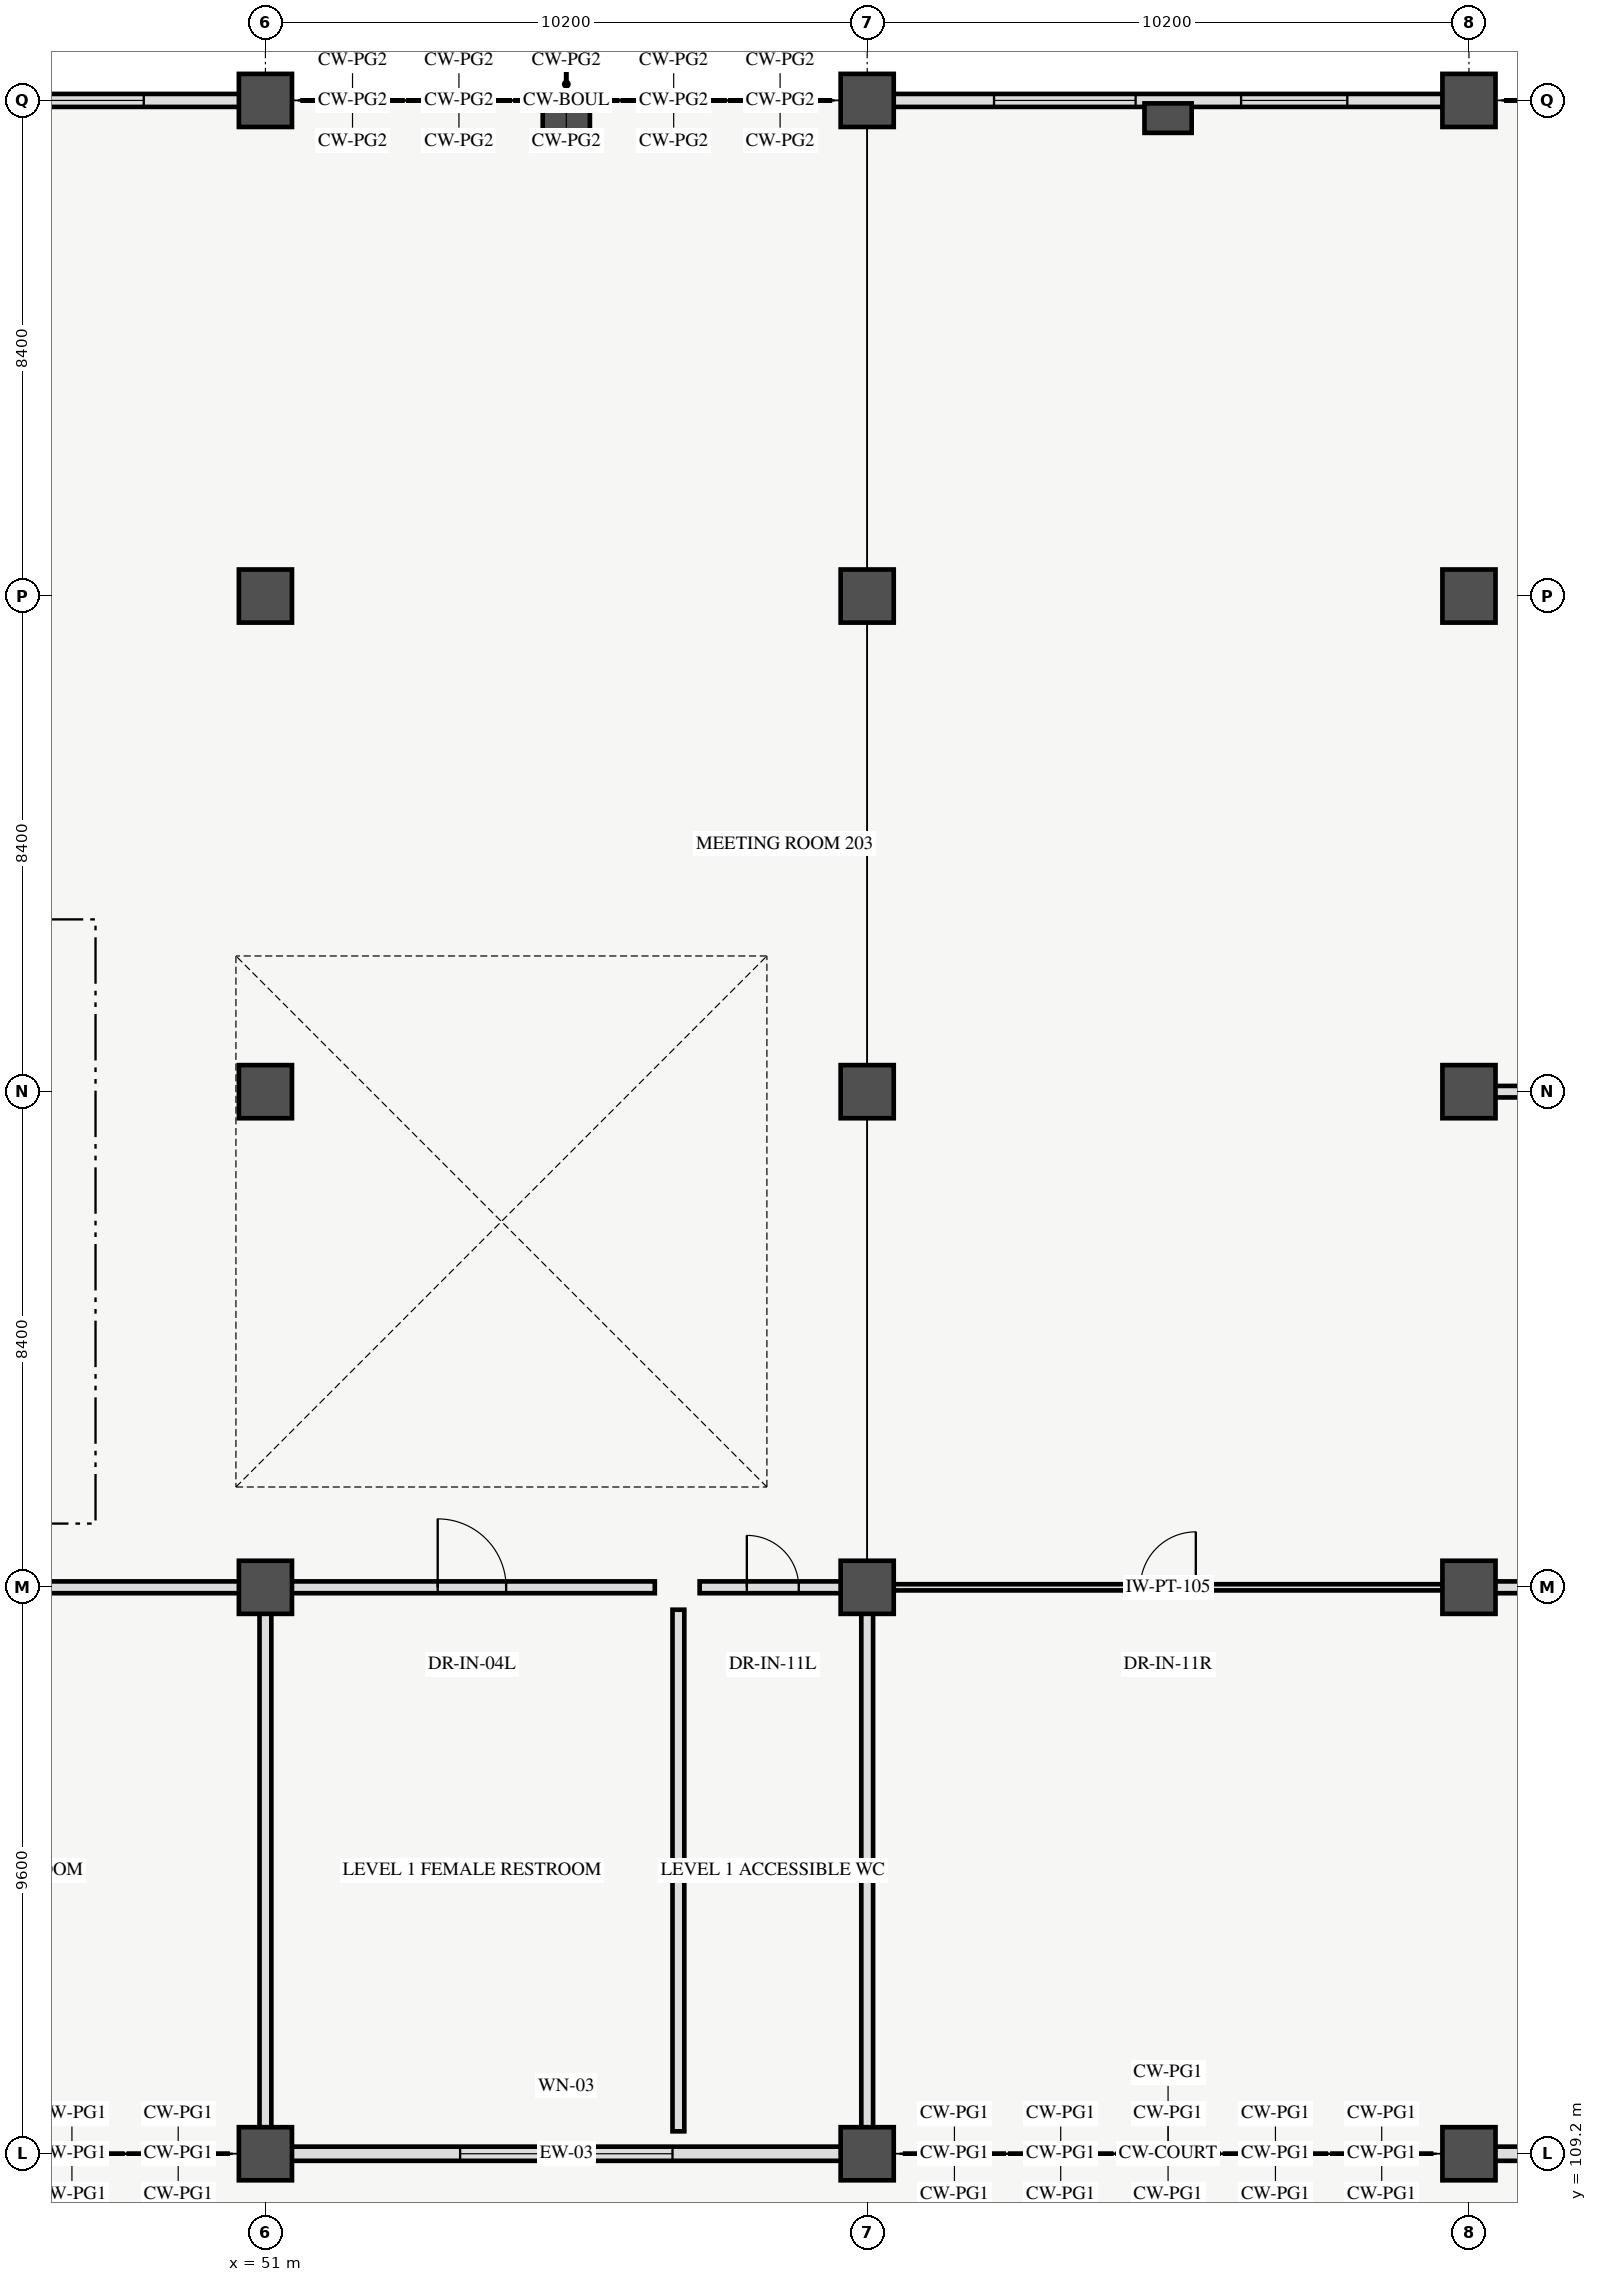
"""IFC4 building model, lengths in metres.
Left out: names, types, materials, properties, quantities, classifications, styles, units other than length and angle.
Written with IfcOpenShell. Run it as: python <this file> out.ifc"""

import sys

from ifc_helpers import new_model, si_unit, direction, frame, frame_2d, origin, origin_2d, place, context, subcontext, project, spatial, rectangle, extrude, element, fill, save


model = new_model("IFC4")
c1 = context("Model", 3, precision=1e-05, world=origin(), true_north=direction((0.0, 1.0)))
c2 = subcontext(c1, "Body", "Model", "MODEL_VIEW")
j1 = project(units=[si_unit("LENGTHUNIT", "METRE"), si_unit("PLANEANGLEUNIT", "RADIAN")], contexts=[c1])
p1 = place(None, origin())
s1 = spatial("IfcSite", under=j1, at=p1, CompositionType="ELEMENT")
p2 = place(p1, origin())
s2 = spatial("IfcBuilding", under=s1, at=p2, CompositionType="ELEMENT")
p3 = place(p2, frame((0.0, 0.0, 5.4)))
s3 = spatial("IfcBuildingStorey", under=s2, at=p3, CompositionType="ELEMENT", Elevation=5.4)
for number, where, z_axis, x_axis in (
    (1, (51.0, 109.2, 0.0), (0.0, 0.0, 1.0), (1.0, 0.0, 0.0)),
    (2, (51.0, 118.8, 0.0), (0.0, 0.0, 1.0), (1.0, 0.0, 0.0)),
    (3, (51.0, 127.2, 0.0), (0.0, 0.0, 1.0), (1.0, 0.0, 0.0)),
    (4, (51.0, 135.6, 0.0), (0.0, 0.0, 1.0), (1.0, 0.0, 0.0)),
    (5, (51.0, 144.0, 0.0), (0.0, 0.0, 1.0), (1.0, 0.0, 0.0)),
    (6, (61.2, 109.2, 0.0), (0.0, 0.0, 1.0), (1.0, 0.0, 0.0)),
    (7, (61.2, 118.8, 0.0), (0.0, 0.0, 1.0), (1.0, 0.0, 0.0)),
    (8, (61.2, 127.2, 0.0), (0.0, 0.0, 1.0), (1.0, 0.0, 0.0)),
    (9, (61.2, 135.6, 0.0), (0.0, 0.0, 1.0), (1.0, 0.0, 0.0)),
    (10, (61.2, 144.0, 0.0), (0.0, 0.0, 1.0), (1.0, 0.0, 0.0)),
    (11, (71.4, 109.2, 0.0), (0.0, 0.0, 1.0), (1.0, 0.0, 0.0)),
    (12, (71.4, 118.8, 0.0), (0.0, 0.0, 1.0), (1.0, 0.0, 0.0)),
    (13, (71.4, 127.2, 0.0), (0.0, 0.0, 1.0), (1.0, 0.0, 0.0)),
    (14, (71.4, 135.6, 0.0), (0.0, 0.0, 1.0), (1.0, 0.0, 0.0)),
    (15, (71.4, 144.0, 0.0), (0.0, 0.0, 1.0), (1.0, 0.0, 0.0)),
):
    element("IfcColumn", number, at=place(p3, frame(where, z_axis=z_axis, x_axis=x_axis)), inside=s3, PredefinedType="COLUMN", context=c2, shape_type="SweptSolid", body=[
        extrude(rectangle(XDim=0.9, YDim=0.9, at=origin_2d()), origin(), (0.0, 0.0, 1.0), 5.4),
    ])
for number, where, z_axis, x_axis in (
    (16, (56.1, 143.7, 0.0), (0.0, 0.0, 1.0), (1.0, 0.0, 0.0)),
    (17, (66.3, 143.7, 0.0), (0.0, 0.0, 1.0), (1.0, 0.0, 0.0)),
):
    element("IfcColumn", number, at=place(p3, frame(where, z_axis=z_axis, x_axis=x_axis)), inside=s3, PredefinedType="PILASTER", context=c2, shape_type="SweptSolid", body=[
        extrude(rectangle(XDim=0.8, YDim=0.5, at=origin_2d()), origin(), (0.0, 0.0, 1.0), 5.4),
    ])
p4 = place(p3, frame((41.04, 144.0, 0.0), z_axis=(0.0, 0.0, 1.0), x_axis=(1.0, 0.0, 0.0)))
e18 = element("IfcWall", 18, at=p4, inside=s3, PredefinedType="STANDARD", context=c2, shape_type="SweptSolid", body=[
    extrude(rectangle(XDim=9.72, YDim=0.22, at=frame_2d((4.86, 0.0))), origin(), (0.0, 0.0, 1.0), 4.32),
])
p5 = place(p4, frame((1.91, 0.0, 0.7)))
e19 = element("IfcOpeningElement", 19, at=p5, cuts=e18, PredefinedType="OPENING", context=c2, shape_type="SweptSolid", body=[
    extrude(rectangle(XDim=2.4, YDim=2.1, at=frame_2d((1.2, 1.05))), frame((0.0, 0.12, 0.0), z_axis=(0.0, -1.0, 0.0), x_axis=(1.0, 0.0, 0.0)), (0.0, 0.0, 1.0), 0.24),
])
p6 = place(p4, frame((6.098, 0.0, 0.85)))
e20 = element("IfcOpeningElement", 20, at=p6, cuts=e18, PredefinedType="OPENING", context=c2, shape_type="SweptSolid", body=[
    extrude(rectangle(XDim=1.8, YDim=1.8, at=frame_2d((0.9, 0.9))), frame((0.0, 0.12, 0.0), z_axis=(0.0, -1.0, 0.0), x_axis=(1.0, 0.0, 0.0)), (0.0, 0.0, 1.0), 0.24),
])
p7 = place(p3, frame((51.24, 109.2, 0.0), z_axis=(0.0, 0.0, 1.0), x_axis=(1.0, 0.0, 0.0)))
e21 = element("IfcWall", 21, at=p7, inside=s3, PredefinedType="STANDARD", context=c2, shape_type="SweptSolid", body=[
    extrude(rectangle(XDim=9.72, YDim=0.24, at=frame_2d((4.86, 0.0))), origin(), (0.0, 0.0, 1.0), 4.32),
])
p8 = place(p7, frame((3.06, 0.0, 0.9)))
e22 = element("IfcOpeningElement", 22, at=p8, cuts=e21, PredefinedType="OPENING", context=c2, shape_type="SweptSolid", body=[
    extrude(rectangle(XDim=3.6, YDim=2.1, at=frame_2d((1.8, 1.05))), frame((0.0, 0.13, 0.0), z_axis=(0.0, -1.0, 0.0), x_axis=(1.0, 0.0, 0.0)), (0.0, 0.0, 1.0), 0.26),
])
p9 = place(p3, frame((61.44, 144.0, 0.0), z_axis=(0.0, 0.0, 1.0), x_axis=(1.0, 0.0, 0.0)))
e23 = element("IfcWall", 23, at=p9, inside=s3, PredefinedType="STANDARD", context=c2, shape_type="SweptSolid", body=[
    extrude(rectangle(XDim=9.72, YDim=0.22, at=frame_2d((4.86, 0.0))), origin(), (0.0, 0.0, 1.0), 4.32),
])
p10 = place(p9, frame((1.91, 0.0, 0.7)))
e24 = element("IfcOpeningElement", 24, at=p10, cuts=e23, PredefinedType="OPENING", context=c2, shape_type="SweptSolid", body=[
    extrude(rectangle(XDim=2.4, YDim=2.1, at=frame_2d((1.2, 1.05))), frame((0.0, 0.12, 0.0), z_axis=(0.0, -1.0, 0.0), x_axis=(1.0, 0.0, 0.0)), (0.0, 0.0, 1.0), 0.24),
])
p11 = place(p9, frame((6.098, 0.0, 0.85)))
e25 = element("IfcOpeningElement", 25, at=p11, cuts=e23, PredefinedType="OPENING", context=c2, shape_type="SweptSolid", body=[
    extrude(rectangle(XDim=1.8, YDim=1.8, at=frame_2d((0.9, 0.9))), frame((0.0, 0.12, 0.0), z_axis=(0.0, -1.0, 0.0), x_axis=(1.0, 0.0, 0.0)), (0.0, 0.0, 1.0), 0.24),
])
p12 = place(p3, frame((71.64, 109.2, 0.0), z_axis=(0.0, 0.0, 1.0), x_axis=(1.0, 0.0, 0.0)))
e26 = element("IfcWall", 26, at=p12, inside=s3, PredefinedType="STANDARD", context=c2, shape_type="SweptSolid", body=[
    extrude(rectangle(XDim=9.72, YDim=0.24, at=frame_2d((4.86, 0.0))), origin(), (0.0, 0.0, 1.0), 4.32),
])
p13 = place(p12, frame((3.06, 0.0, 0.9)))
e27 = element("IfcOpeningElement", 27, at=p13, cuts=e26, PredefinedType="OPENING", context=c2, shape_type="SweptSolid", body=[
    extrude(rectangle(XDim=3.6, YDim=2.1, at=frame_2d((1.8, 1.05))), frame((0.0, 0.13, 0.0), z_axis=(0.0, -1.0, 0.0), x_axis=(1.0, 0.0, 0.0)), (0.0, 0.0, 1.0), 0.26),
])
p14 = place(p3, frame((71.8, 127.2, 0.0), z_axis=(0.0, 0.0, 1.0), x_axis=(1.0, 0.0, 0.0)))
e28 = element("IfcWall", 28, at=p14, inside=s3, PredefinedType="MOVABLE", context=c2, shape_type="SweptSolid", body=[
    extrude(rectangle(XDim=9.4, YDim=0.195, at=frame_2d((4.7, 0.0))), origin(), (0.0, 0.0, 1.0), 4.2),
])
p15 = place(p14, frame((3.725, 0.0, 0.0)))
e29 = element("IfcOpeningElement", 29, at=p15, cuts=e28, PredefinedType="OPENING", context=c2, shape_type="SweptSolid", body=[
    extrude(rectangle(XDim=1.95, YDim=2.34, at=frame_2d((0.975, 1.17))), frame((0.0, 0.107, 0.0), z_axis=(0.0, -1.0, 0.0), x_axis=(1.0, 0.0, 0.0)), (0.0, 0.0, 1.0), 0.215),
])
p16 = place(p3, frame((41.2, 118.8, 0.0), z_axis=(0.0, 0.0, 1.0), x_axis=(1.0, 0.0, 0.0)))
e30 = element("IfcWall", 30, at=p16, inside=s3, PredefinedType="PARTITIONING", context=c2, shape_type="SweptSolid", body=[
    extrude(rectangle(XDim=9.4, YDim=0.2, at=frame_2d((4.7, 0.0))), origin(), (0.0, 0.0, 1.0), 4.2),
])
p17 = place(p16, frame((4.22, 0.0, 0.0)))
e31 = element("IfcOpeningElement", 31, at=p17, cuts=e30, PredefinedType="OPENING", context=c2, shape_type="SweptSolid", body=[
    extrude(rectangle(XDim=0.96, YDim=2.1, at=frame_2d((0.48, 1.05))), frame((0.0, 0.11, 0.0), z_axis=(0.0, -1.0, 0.0), x_axis=(1.0, 0.0, 0.0)), (0.0, 0.0, 1.0), 0.22),
])
p18 = place(p3, frame((51.4, 118.8, 0.0), z_axis=(0.0, 0.0, 1.0), x_axis=(1.0, 0.0, 0.0)))
e32 = element("IfcWall", 32, at=p18, inside=s3, PredefinedType="PARTITIONING", context=c2, shape_type="SweptSolid", body=[
    extrude(rectangle(XDim=6.2, YDim=0.2, at=frame_2d((3.1, 0.0))), origin(), (0.0, 0.0, 1.0), 4.2),
])
p19 = place(p18, frame((2.52, 0.0, 0.0)))
e33 = element("IfcOpeningElement", 33, at=p19, cuts=e32, PredefinedType="OPENING", context=c2, shape_type="SweptSolid", body=[
    extrude(rectangle(XDim=1.16, YDim=2.2, at=frame_2d((0.58, 1.1))), frame((0.0, 0.11, 0.0), z_axis=(0.0, -1.0, 0.0), x_axis=(1.0, 0.0, 0.0)), (0.0, 0.0, 1.0), 0.22),
])
p20 = place(p3, frame((61.6, 118.8, 0.0), z_axis=(0.0, 0.0, 1.0), x_axis=(1.0, 0.0, 0.0)))
e34 = element("IfcWall", 34, at=p20, inside=s3, PredefinedType="PARTITIONING", context=c2, shape_type="SweptSolid", body=[
    extrude(rectangle(XDim=9.4, YDim=0.105, at=frame_2d((4.7, 0.0))), origin(), (0.0, 0.0, 1.0), 4.2),
])
p21 = place(p20, frame((4.23, 0.0, 0.0)))
e35 = element("IfcOpeningElement", 35, at=p21, cuts=e34, PredefinedType="OPENING", context=c2, shape_type="SweptSolid", body=[
    extrude(rectangle(XDim=0.94, YDim=2.08, at=frame_2d((0.47, 1.04))), frame((0.0, 0.062, 0.0), z_axis=(0.0, -1.0, 0.0), x_axis=(1.0, 0.0, 0.0)), (0.0, 0.0, 1.0), 0.125),
])
p22 = place(p3, frame((71.8, 118.8, 0.0), z_axis=(0.0, 0.0, 1.0), x_axis=(1.0, 0.0, 0.0)))
e36 = element("IfcWall", 36, at=p22, inside=s3, PredefinedType="PARTITIONING", context=c2, shape_type="SweptSolid", body=[
    extrude(rectangle(XDim=9.4, YDim=0.2, at=frame_2d((4.7, 0.0))), origin(), (0.0, 0.0, 1.0), 4.2),
])
p23 = place(p22, frame((4.21, 0.0, 0.0)))
e37 = element("IfcOpeningElement", 37, at=p23, cuts=e36, PredefinedType="OPENING", context=c2, shape_type="SweptSolid", body=[
    extrude(rectangle(XDim=0.98, YDim=2.12, at=frame_2d((0.49, 1.06))), frame((0.0, 0.11, 0.0), z_axis=(0.0, -1.0, 0.0), x_axis=(1.0, 0.0, 0.0)), (0.0, 0.0, 1.0), 0.22),
])
p24 = place(p3, frame((58.36, 118.8, 0.0), z_axis=(0.0, 0.0, 1.0), x_axis=(1.0, 0.0, 0.0)))
e38 = element("IfcWall", 38, at=p24, inside=s3, PredefinedType="PARTITIONING", context=c2, shape_type="SweptSolid", body=[
    extrude(rectangle(XDim=2.48, YDim=0.2, at=frame_2d((1.24, 0.0))), origin(), (0.0, 0.0, 1.0), 4.2),
])
p25 = place(p24, frame((0.8, 0.0, 0.0)))
e39 = element("IfcOpeningElement", 39, at=p25, cuts=e38, PredefinedType="OPENING", context=c2, shape_type="SweptSolid", body=[
    extrude(rectangle(XDim=0.88, YDim=2.08, at=frame_2d((0.44, 1.04))), frame((0.0, 0.11, 0.0), z_axis=(0.0, -1.0, 0.0), x_axis=(1.0, 0.0, 0.0)), (0.0, 0.0, 1.0), 0.22),
])
for number, where, z_axis, x_axis in (
    (40, (51.0, 109.58, 0.0), (0.0, 0.0, 1.0), (0.0, 1.0, 0.0)),
    (41, (58.0, 109.58, 0.0), (0.0, 0.0, 1.0), (0.0, 1.0, 0.0)),
    (42, (61.2, 109.58, 0.0), (0.0, 0.0, 1.0), (0.0, 1.0, 0.0)),
):
    element("IfcWall", number, at=place(p3, frame(where, z_axis=z_axis, x_axis=x_axis)), inside=s3, PredefinedType="PARTITIONING", context=c2, shape_type="SweptSolid", body=[
        extrude(rectangle(XDim=8.84, YDim=0.2, at=frame_2d((4.42, 0.0))), origin(), (0.0, 0.0, 1.0), 4.2),
    ])
p26 = place(p6, origin())
e43 = element("IfcWindow", 43, at=p26, inside=s3, PartitioningType="DOUBLE_PANEL_VERTICAL", PredefinedType="WINDOW", context=c2, shape_type="SweptSolid", body=[
    extrude(rectangle(XDim=1.8, YDim=1.8, at=frame_2d((0.9, 0.9))), frame((0.0, 0.03, 0.0), z_axis=(0.0, -1.0, 0.0), x_axis=(1.0, 0.0, 0.0)), (0.0, 0.0, 1.0), 0.06),
])
fill(e20, e43)
p27 = place(p8, origin())
e44 = element("IfcWindow", 44, at=p27, inside=s3, PartitioningType="TRIPLE_PANEL_VERTICAL", PredefinedType="WINDOW", context=c2, shape_type="SweptSolid", body=[
    extrude(rectangle(XDim=3.6, YDim=2.1, at=frame_2d((1.8, 1.05))), frame((0.0, 0.03, 0.0), z_axis=(0.0, -1.0, 0.0), x_axis=(1.0, 0.0, 0.0)), (0.0, 0.0, 1.0), 0.06),
])
fill(e22, e44)
p28 = place(p10, origin())
e45 = element("IfcWindow", 45, at=p28, inside=s3, PartitioningType="DOUBLE_PANEL_VERTICAL", PredefinedType="WINDOW", context=c2, shape_type="SweptSolid", body=[
    extrude(rectangle(XDim=2.4, YDim=2.1, at=frame_2d((1.2, 1.05))), frame((0.0, 0.03, 0.0), z_axis=(0.0, -1.0, 0.0), x_axis=(1.0, 0.0, 0.0)), (0.0, 0.0, 1.0), 0.06),
])
fill(e24, e45)
p29 = place(p11, origin())
e46 = element("IfcWindow", 46, at=p29, inside=s3, PartitioningType="DOUBLE_PANEL_VERTICAL", PredefinedType="WINDOW", context=c2, shape_type="SweptSolid", body=[
    extrude(rectangle(XDim=1.8, YDim=1.8, at=frame_2d((0.9, 0.9))), frame((0.0, 0.03, 0.0), z_axis=(0.0, -1.0, 0.0), x_axis=(1.0, 0.0, 0.0)), (0.0, 0.0, 1.0), 0.06),
])
fill(e25, e46)
p30 = place(p19, origin())
e47 = element("IfcDoor", 47, at=p30, inside=s3, OperationType="SINGLE_SWING_LEFT", PredefinedType="DOOR", context=c2, shape_type="SweptSolid", body=[
    extrude(rectangle(XDim=1.16, YDim=2.2, at=frame_2d((0.58, 1.1))), frame((0.0, 0.025, 0.0), z_axis=(0.0, -1.0, 0.0), x_axis=(1.0, 0.0, 0.0)), (0.0, 0.0, 1.0), 0.05),
])
fill(e33, e47)
p31 = place(p21, origin())
e48 = element("IfcDoor", 48, at=p31, inside=s3, OperationType="SINGLE_SWING_RIGHT", PredefinedType="DOOR", context=c2, shape_type="SweptSolid", body=[
    extrude(rectangle(XDim=0.94, YDim=2.08, at=frame_2d((0.47, 1.04))), frame((0.0, 0.025, 0.0), z_axis=(0.0, -1.0, 0.0), x_axis=(1.0, 0.0, 0.0)), (0.0, 0.0, 1.0), 0.05),
])
fill(e35, e48)
p32 = place(p25, origin())
e49 = element("IfcDoor", 49, at=p32, inside=s3, OperationType="SINGLE_SWING_LEFT", PredefinedType="DOOR", context=c2, shape_type="SweptSolid", body=[
    extrude(rectangle(XDim=0.88, YDim=2.08, at=frame_2d((0.44, 1.04))), frame((0.0, 0.025, 0.0), z_axis=(0.0, -1.0, 0.0), x_axis=(1.0, 0.0, 0.0)), (0.0, 0.0, 1.0), 0.05),
])
fill(e39, e49)
save(model, sys.argv[1])
